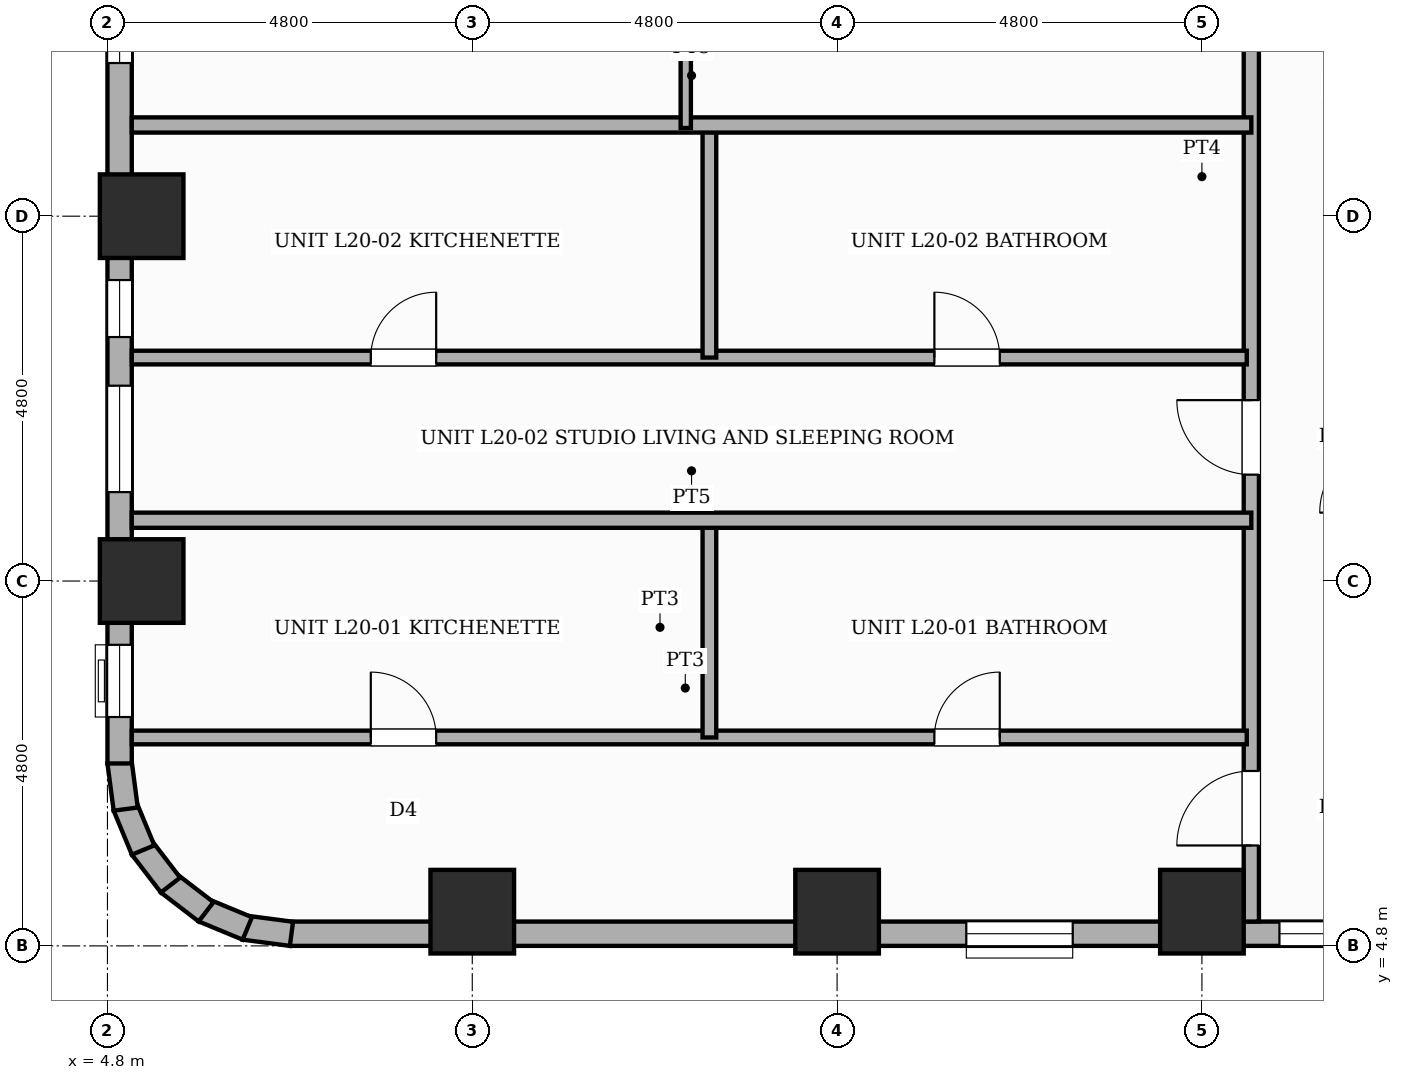
"""IFC4 building model, lengths in metres.
Left out: names, types, materials, properties, quantities, classifications, styles, units other than length and angle.
Written with IfcOpenShell. Run it as: python <this file> out.ifc"""

import sys

from ifc_helpers import new_model, si_unit, direction, frame, frame_2d, origin, origin_2d, place, context, subcontext, project, spatial, rectangle, extrude, element, fill, save


model = new_model("IFC4")
c1 = context("Model", 3, precision=1e-05, world=origin(), true_north=direction((0.0, 1.0)))
c2 = subcontext(c1, "Body", "Model", "MODEL_VIEW")
j1 = project(units=[si_unit("LENGTHUNIT", "METRE"), si_unit("PLANEANGLEUNIT", "RADIAN")], contexts=[c1])
p1 = place(None, origin())
s1 = spatial("IfcSite", under=j1, at=p1, CompositionType="ELEMENT")
p2 = place(p1, origin())
s2 = spatial("IfcBuilding", under=s1, at=p2, CompositionType="ELEMENT")
p3 = place(p2, frame((0.0, 0.0, 79.0)))
s3 = spatial("IfcBuildingStorey", under=s2, at=p3, CompositionType="ELEMENT", Elevation=79.0)
for number, where, z_axis, x_axis in (
    (1, (5.25, 9.6, 0.0), (0.0, 0.0, 1.0), (1.0, 0.0, 0.0)),
    (2, (5.25, 14.4, 0.0), (0.0, 0.0, 1.0), (1.0, 0.0, 0.0)),
    (3, (9.6, 5.25, 0.0), (0.0, 0.0, 1.0), (1.0, 0.0, 0.0)),
    (4, (14.4, 5.25, 0.0), (0.0, 0.0, 1.0), (1.0, 0.0, 0.0)),
    (5, (19.2, 5.25, 0.0), (0.0, 0.0, 1.0), (1.0, 0.0, 0.0)),
):
    element("IfcColumn", number, at=place(p3, frame(where, z_axis=z_axis, x_axis=x_axis)), inside=s3, PredefinedType="COLUMN", context=c2, shape_type="SweptSolid", body=[
        extrude(rectangle(XDim=1.1, YDim=1.1, at=origin_2d()), origin(), (0.0, 0.0, 1.0), 3.6),
    ])
p4 = place(p3, frame((21.6, 4.96, 0.0), z_axis=(0.0, 0.0, 1.0), x_axis=(-1.0, 0.0, 0.0)))
e6 = element("IfcWall", 6, at=p4, inside=s3, PredefinedType="STANDARD", context=c2, shape_type="SweptSolid", body=[
    extrude(rectangle(XDim=14.4, YDim=0.32, at=frame_2d((7.2, 0.0))), origin(), (0.0, 0.0, 1.0), 2.53),
])
p5 = place(p4, frame((4.1, 0.0, 0.65)))
e7 = element("IfcOpeningElement", 7, at=p5, cuts=e6, PredefinedType="OPENING", context=c2, shape_type="SweptSolid", body=[
    extrude(rectangle(XDim=1.4, YDim=1.1, at=frame_2d((0.7, 0.55))), frame((0.0, 0.17, 0.0), z_axis=(0.0, -1.0, 0.0), x_axis=(1.0, 0.0, 0.0)), (0.0, 0.0, 1.0), 0.34),
])
p6 = place(p4, frame((0.43, 0.0, 0.45)))
e8 = element("IfcOpeningElement", 8, at=p6, cuts=e6, PredefinedType="OPENING", context=c2, shape_type="SweptSolid", body=[
    extrude(rectangle(XDim=0.95, YDim=1.8, at=frame_2d((0.475, 0.9))), frame((0.0, 0.17, 0.0), z_axis=(0.0, -1.0, 0.0), x_axis=(1.0, 0.0, 0.0)), (0.0, 0.0, 1.0), 0.34),
])
p7 = place(p3, frame((7.221, 4.958, 0.0), z_axis=(0.0, 0.0, 1.0), x_axis=(-0.991447664465, 0.130504898859, 0.0)))
e9 = element("IfcWall", 9, at=p7, inside=s3, PredefinedType="STANDARD", context=c2, shape_type="SweptSolid", body=[
    extrude(rectangle(XDim=0.627, YDim=0.32, at=frame_2d((0.313, 0.0))), origin(), (0.0, 0.0, 1.0), 3.35),
])
p8 = place(p3, frame((6.64, 5.03, 0.0), z_axis=(0.0, 0.0, 1.0), x_axis=(-0.923836271867, 0.382787856107, 0.0)))
e10 = element("IfcWall", 10, at=p8, inside=s3, PredefinedType="STANDARD", context=c2, shape_type="SweptSolid", body=[
    extrude(rectangle(XDim=0.626, YDim=0.32, at=frame_2d((0.313, 0.0))), origin(), (0.0, 0.0, 1.0), 3.35),
])
for number, where, z_axis, x_axis in (
    (11, (6.097, 5.248, 0.0), (0.0, 0.0, 1.0), (-0.793, 0.609, 0.0)),
    (12, (5.63, 5.6, 0.0), (0.0, 0.0, 1.0), (-0.609, 0.793, 0.0)),
):
    element("IfcWall", number, at=place(p3, frame(where, z_axis=z_axis, x_axis=x_axis)), inside=s3, PredefinedType="STANDARD", context=c2, shape_type="SweptSolid", body=[
        extrude(rectangle(XDim=0.627, YDim=0.32, at=frame_2d((0.313, 0.0))), origin(), (0.0, 0.0, 1.0), 3.35),
    ])
p9 = place(p3, frame((5.269, 6.061, 0.0), z_axis=(0.0, 0.0, 1.0), x_axis=(-0.382787856107, 0.923836271867, 0.0)))
e13 = element("IfcWall", 13, at=p9, inside=s3, PredefinedType="STANDARD", context=c2, shape_type="SweptSolid", body=[
    extrude(rectangle(XDim=0.626, YDim=0.32, at=frame_2d((0.313, 0.0))), origin(), (0.0, 0.0, 1.0), 3.35),
])
p10 = place(p3, frame((5.04, 6.6, 0.0), z_axis=(0.0, 0.0, 1.0), x_axis=(-0.130504898859, 0.991447664465, 0.0)))
e14 = element("IfcWall", 14, at=p10, inside=s3, PredefinedType="STANDARD", context=c2, shape_type="SweptSolid", body=[
    extrude(rectangle(XDim=0.627, YDim=0.32, at=frame_2d((0.313, 0.0))), origin(), (0.0, 0.0, 1.0), 3.35),
])
p11 = place(p3, frame((4.96, 7.2, 0.0), z_axis=(0.0, 0.0, 1.0), x_axis=(0.0, 1.0, 0.0)))
e15 = element("IfcWall", 15, at=p11, inside=s3, PredefinedType="STANDARD", context=c2, shape_type="SweptSolid", body=[
    extrude(rectangle(XDim=38.4, YDim=0.32, at=frame_2d((19.2, 0.0))), origin(), (0.0, 0.0, 1.0), 2.53),
])
p12 = place(p11, frame((14.1, 0.0, 0.0)))
e16 = element("IfcOpeningElement", 16, at=p12, cuts=e15, PredefinedType="OPENING", context=c2, shape_type="SweptSolid", body=[
    extrude(rectangle(XDim=1.1, YDim=2.15, at=frame_2d((0.55, 1.075))), frame((0.0, 0.17, 0.0), z_axis=(0.0, -1.0, 0.0), x_axis=(1.0, 0.0, 0.0)), (0.0, 0.0, 1.0), 0.34),
])
p13 = place(p11, frame((3.57, 0.0, 0.65)))
e17 = element("IfcOpeningElement", 17, at=p13, cuts=e15, PredefinedType="OPENING", context=c2, shape_type="SweptSolid", body=[
    extrude(rectangle(XDim=1.4, YDim=1.1, at=frame_2d((0.7, 0.55))), frame((0.0, 0.17, 0.0), z_axis=(0.0, -1.0, 0.0), x_axis=(1.0, 0.0, 0.0)), (0.0, 0.0, 1.0), 0.34),
])
p14 = place(p11, frame((0.611, 0.0, 0.45)))
e18 = element("IfcOpeningElement", 18, at=p14, cuts=e15, PredefinedType="OPENING", context=c2, shape_type="SweptSolid", body=[
    extrude(rectangle(XDim=0.95, YDim=1.8, at=frame_2d((0.475, 0.9))), frame((0.0, 0.17, 0.0), z_axis=(0.0, -1.0, 0.0), x_axis=(1.0, 0.0, 0.0)), (0.0, 0.0, 1.0), 0.34),
])
p15 = place(p11, frame((5.61, 0.0, 0.45)))
e19 = element("IfcOpeningElement", 19, at=p15, cuts=e15, PredefinedType="OPENING", context=c2, shape_type="SweptSolid", body=[
    extrude(rectangle(XDim=0.75, YDim=1.8, at=frame_2d((0.375, 0.9))), frame((0.0, 0.17, 0.0), z_axis=(0.0, -1.0, 0.0), x_axis=(1.0, 0.0, 0.0)), (0.0, 0.0, 1.0), 0.34),
])
p16 = place(p11, frame((9.215, 0.0, 0.65)))
e20 = element("IfcOpeningElement", 20, at=p16, cuts=e15, PredefinedType="OPENING", context=c2, shape_type="SweptSolid", body=[
    extrude(rectangle(XDim=1.4, YDim=1.1, at=frame_2d((0.7, 0.55))), frame((0.0, 0.17, 0.0), z_axis=(0.0, -1.0, 0.0), x_axis=(1.0, 0.0, 0.0)), (0.0, 0.0, 1.0), 0.34),
])
p17 = place(p11, frame((17.58, 0.0, 0.45)))
e21 = element("IfcOpeningElement", 21, at=p17, cuts=e15, PredefinedType="OPENING", context=c2, shape_type="SweptSolid", body=[
    extrude(rectangle(XDim=0.75, YDim=1.8, at=frame_2d((0.375, 0.9))), frame((0.0, 0.17, 0.0), z_axis=(0.0, -1.0, 0.0), x_axis=(1.0, 0.0, 0.0)), (0.0, 0.0, 1.0), 0.34),
])
p18 = place(p3, frame((19.85, 5.12, 0.0), z_axis=(0.0, 0.0, 1.0), x_axis=(0.0, 1.0, 0.0)))
e22 = element("IfcWall", 22, at=p18, inside=s3, PredefinedType="PARTITIONING", context=c2, shape_type="SweptSolid", body=[
    extrude(rectangle(XDim=18.28, YDim=0.2, at=frame_2d((9.14, 0.0))), origin(), (0.0, 0.0, 1.0), 3.35),
])
p19 = place(p18, frame((1.001, 0.0, 0.0)))
e23 = element("IfcOpeningElement", 23, at=p19, cuts=e22, PredefinedType="OPENING", context=c2, shape_type="SweptSolid", body=[
    extrude(rectangle(XDim=0.98, YDim=2.18, at=frame_2d((0.49, 1.09))), frame((0.0, 0.11, 0.0), z_axis=(0.0, -1.0, 0.0), x_axis=(1.0, 0.0, 0.0)), (0.0, 0.0, 1.0), 0.22),
])
p20 = place(p18, frame((5.88, 0.0, 0.0)))
e24 = element("IfcOpeningElement", 24, at=p20, cuts=e22, PredefinedType="OPENING", context=c2, shape_type="SweptSolid", body=[
    extrude(rectangle(XDim=0.98, YDim=2.18, at=frame_2d((0.49, 1.09))), frame((0.0, 0.11, 0.0), z_axis=(0.0, -1.0, 0.0), x_axis=(1.0, 0.0, 0.0)), (0.0, 0.0, 1.0), 0.22),
])
p21 = place(p18, frame((12.74, 0.0, 0.0)))
e25 = element("IfcOpeningElement", 25, at=p21, cuts=e22, PredefinedType="OPENING", context=c2, shape_type="SweptSolid", body=[
    extrude(rectangle(XDim=0.98, YDim=2.18, at=frame_2d((0.49, 1.09))), frame((0.0, 0.11, 0.0), z_axis=(0.0, -1.0, 0.0), x_axis=(1.0, 0.0, 0.0)), (0.0, 0.0, 1.0), 0.22),
])
p22 = place(p3, frame((5.12, 7.542, 0.0), z_axis=(0.0, 0.0, 1.0), x_axis=(1.0, 0.0, 0.0)))
e26 = element("IfcWall", 26, at=p22, inside=s3, PredefinedType="PLUMBINGWALL", context=c2, shape_type="SweptSolid", body=[
    extrude(rectangle(XDim=14.67, YDim=0.18, at=frame_2d((7.335, 0.0))), origin(), (0.0, 0.0, 1.0), 3.35),
])
p23 = place(p22, frame((3.145, 0.0, 0.0)))
e27 = element("IfcOpeningElement", 27, at=p23, cuts=e26, PredefinedType="OPENING", context=c2, shape_type="SweptSolid", body=[
    extrude(rectangle(XDim=0.86, YDim=2.1, at=frame_2d((0.43, 1.05))), frame((0.0, 0.1, 0.0), z_axis=(0.0, -1.0, 0.0), x_axis=(1.0, 0.0, 0.0)), (0.0, 0.0, 1.0), 0.2),
])
p24 = place(p22, frame((10.56, 0.0, 0.0)))
e28 = element("IfcOpeningElement", 28, at=p24, cuts=e26, PredefinedType="OPENING", context=c2, shape_type="SweptSolid", body=[
    extrude(rectangle(XDim=0.86, YDim=2.1, at=frame_2d((0.43, 1.05))), frame((0.0, 0.1, 0.0), z_axis=(0.0, -1.0, 0.0), x_axis=(1.0, 0.0, 0.0)), (0.0, 0.0, 1.0), 0.2),
])
p25 = place(p3, frame((12.72, 7.542, 0.0), z_axis=(0.0, 0.0, 1.0), x_axis=(0.0, 1.0, 0.0)))
e29 = element("IfcWall", 29, at=p25, inside=s3, PredefinedType="PLUMBINGWALL", context=c2, shape_type="SweptSolid", body=[
    extrude(rectangle(XDim=2.898, YDim=0.18, at=frame_2d((1.449, 0.0))), origin(), (0.0, 0.0, 1.0), 3.35),
])
p26 = place(p3, frame((5.12, 10.4, 0.0), z_axis=(0.0, 0.0, 1.0), x_axis=(1.0, 0.0, 0.0)))
e30 = element("IfcWall", 30, at=p26, inside=s3, PredefinedType="SOLIDWALL", context=c2, shape_type="SweptSolid", body=[
    extrude(rectangle(XDim=14.73, YDim=0.2, at=frame_2d((7.365, 0.0))), origin(), (0.0, 0.0, 1.0), 3.35),
])
p27 = place(p3, frame((5.12, 12.54, 0.0), z_axis=(0.0, 0.0, 1.0), x_axis=(1.0, 0.0, 0.0)))
e31 = element("IfcWall", 31, at=p27, inside=s3, PredefinedType="PLUMBINGWALL", context=c2, shape_type="SweptSolid", body=[
    extrude(rectangle(XDim=14.67, YDim=0.18, at=frame_2d((7.335, 0.0))), origin(), (0.0, 0.0, 1.0), 3.35),
])
p28 = place(p27, frame((3.145, 0.0, 0.0)))
e32 = element("IfcOpeningElement", 32, at=p28, cuts=e31, PredefinedType="OPENING", context=c2, shape_type="SweptSolid", body=[
    extrude(rectangle(XDim=0.86, YDim=2.1, at=frame_2d((0.43, 1.05))), frame((0.0, 0.1, 0.0), z_axis=(0.0, -1.0, 0.0), x_axis=(1.0, 0.0, 0.0)), (0.0, 0.0, 1.0), 0.2),
])
p29 = place(p27, frame((10.56, 0.0, 0.0)))
e33 = element("IfcOpeningElement", 33, at=p29, cuts=e31, PredefinedType="OPENING", context=c2, shape_type="SweptSolid", body=[
    extrude(rectangle(XDim=0.86, YDim=2.1, at=frame_2d((0.43, 1.05))), frame((0.0, 0.1, 0.0), z_axis=(0.0, -1.0, 0.0), x_axis=(1.0, 0.0, 0.0)), (0.0, 0.0, 1.0), 0.2),
])
p30 = place(p3, frame((12.72, 12.54, 0.0), z_axis=(0.0, 0.0, 1.0), x_axis=(0.0, 1.0, 0.0)))
e34 = element("IfcWall", 34, at=p30, inside=s3, PredefinedType="PLUMBINGWALL", context=c2, shape_type="SweptSolid", body=[
    extrude(rectangle(XDim=3.1, YDim=0.18, at=frame_2d((1.55, 0.0))), origin(), (0.0, 0.0, 1.0), 3.35),
])
p31 = place(p3, frame((5.12, 15.6, 0.0), z_axis=(0.0, 0.0, 1.0), x_axis=(1.0, 0.0, 0.0)))
e35 = element("IfcWall", 35, at=p31, inside=s3, PredefinedType="SOLIDWALL", context=c2, shape_type="SweptSolid", body=[
    extrude(rectangle(XDim=14.73, YDim=0.2, at=frame_2d((7.365, 0.0))), origin(), (0.0, 0.0, 1.0), 3.35),
])
p32 = place(p3, frame((12.409, 15.56, 0.0), z_axis=(0.0, 0.0, 1.0), x_axis=(0.0, 1.0, 0.0)))
e36 = element("IfcWall", 36, at=p32, inside=s3, PredefinedType="PARTITIONING", context=c2, shape_type="SweptSolid", body=[
    extrude(rectangle(XDim=5.5, YDim=0.135, at=frame_2d((2.75, 0.0))), origin(), (0.0, 0.0, 1.0), 3.35),
])
p33 = place(p32, frame((2.034, 0.0, 0.0)))
e37 = element("IfcOpeningElement", 37, at=p33, cuts=e36, PredefinedType="OPENING", context=c2, shape_type="SweptSolid", body=[
    extrude(rectangle(XDim=0.9, YDim=2.15, at=frame_2d((0.45, 1.075))), frame((0.0, 0.078, 0.0), z_axis=(0.0, -1.0, 0.0), x_axis=(1.0, 0.0, 0.0)), (0.0, 0.0, 1.0), 0.155),
])
p34 = place(p5, origin())
e38 = element("IfcWindow", 38, at=p34, inside=s3, PartitioningType="SINGLE_PANEL", PredefinedType="WINDOW", context=c2, shape_type="SweptSolid", body=[
    extrude(rectangle(XDim=1.4, YDim=1.1, at=frame_2d((0.7, 0.55))), frame((0.0, 0.03, 0.0), z_axis=(0.0, -1.0, 0.0), x_axis=(1.0, 0.0, 0.0)), (0.0, 0.0, 1.0), 0.06),
])
fill(e7, e38)
p35 = place(p6, origin())
e39 = element("IfcWindow", 39, at=p35, inside=s3, PartitioningType="SINGLE_PANEL", PredefinedType="WINDOW", context=c2, shape_type="SweptSolid", body=[
    extrude(rectangle(XDim=0.95, YDim=1.8, at=frame_2d((0.475, 0.9))), frame((0.0, 0.03, 0.0), z_axis=(0.0, -1.0, 0.0), x_axis=(1.0, 0.0, 0.0)), (0.0, 0.0, 1.0), 0.06),
])
fill(e8, e39)
p36 = place(p13, origin())
e40 = element("IfcWindow", 40, at=p36, inside=s3, PartitioningType="SINGLE_PANEL", PredefinedType="WINDOW", context=c2, shape_type="SweptSolid", body=[
    extrude(rectangle(XDim=1.4, YDim=1.1, at=frame_2d((0.7, 0.55))), frame((0.0, 0.03, 0.0), z_axis=(0.0, -1.0, 0.0), x_axis=(1.0, 0.0, 0.0)), (0.0, 0.0, 1.0), 0.06),
])
fill(e17, e40)
p37 = place(p14, origin())
e41 = element("IfcWindow", 41, at=p37, inside=s3, PartitioningType="SINGLE_PANEL", PredefinedType="WINDOW", context=c2, shape_type="SweptSolid", body=[
    extrude(rectangle(XDim=0.95, YDim=1.8, at=frame_2d((0.475, 0.9))), frame((0.0, 0.03, 0.0), z_axis=(0.0, -1.0, 0.0), x_axis=(1.0, 0.0, 0.0)), (0.0, 0.0, 1.0), 0.06),
])
fill(e18, e41)
p38 = place(p15, origin())
e42 = element("IfcWindow", 42, at=p38, inside=s3, PartitioningType="SINGLE_PANEL", PredefinedType="WINDOW", context=c2, shape_type="SweptSolid", body=[
    extrude(rectangle(XDim=0.75, YDim=1.8, at=frame_2d((0.375, 0.9))), frame((0.0, 0.03, 0.0), z_axis=(0.0, -1.0, 0.0), x_axis=(1.0, 0.0, 0.0)), (0.0, 0.0, 1.0), 0.06),
])
fill(e19, e42)
p39 = place(p16, origin())
e43 = element("IfcWindow", 43, at=p39, inside=s3, PartitioningType="SINGLE_PANEL", PredefinedType="WINDOW", context=c2, shape_type="SweptSolid", body=[
    extrude(rectangle(XDim=1.4, YDim=1.1, at=frame_2d((0.7, 0.55))), frame((0.0, 0.03, 0.0), z_axis=(0.0, -1.0, 0.0), x_axis=(1.0, 0.0, 0.0)), (0.0, 0.0, 1.0), 0.06),
])
fill(e20, e43)
p40 = place(p19, origin())
e44 = element("IfcDoor", 44, at=p40, inside=s3, OperationType="SINGLE_SWING_LEFT", PredefinedType="DOOR", context=c2, shape_type="SweptSolid", body=[
    extrude(rectangle(XDim=0.98, YDim=2.18, at=frame_2d((0.49, 1.09))), frame((0.0, 0.025, 0.0), z_axis=(0.0, -1.0, 0.0), x_axis=(1.0, 0.0, 0.0)), (0.0, 0.0, 1.0), 0.05),
])
fill(e23, e44)
p41 = place(p23, origin())
e45 = element("IfcDoor", 45, at=p41, inside=s3, OperationType="SINGLE_SWING_LEFT", PredefinedType="DOOR", context=c2, shape_type="SweptSolid", body=[
    extrude(rectangle(XDim=0.86, YDim=2.1, at=frame_2d((0.43, 1.05))), frame((0.0, 0.025, 0.0), z_axis=(0.0, -1.0, 0.0), x_axis=(1.0, 0.0, 0.0)), (0.0, 0.0, 1.0), 0.05),
])
fill(e27, e45)
p42 = place(p24, origin())
e46 = element("IfcDoor", 46, at=p42, inside=s3, OperationType="SINGLE_SWING_RIGHT", PredefinedType="DOOR", context=c2, shape_type="SweptSolid", body=[
    extrude(rectangle(XDim=0.86, YDim=2.1, at=frame_2d((0.43, 1.05))), frame((0.0, 0.025, 0.0), z_axis=(0.0, -1.0, 0.0), x_axis=(1.0, 0.0, 0.0)), (0.0, 0.0, 1.0), 0.05),
])
fill(e28, e46)
p43 = place(p20, origin())
e47 = element("IfcDoor", 47, at=p43, inside=s3, OperationType="SINGLE_SWING_RIGHT", PredefinedType="DOOR", context=c2, shape_type="SweptSolid", body=[
    extrude(rectangle(XDim=0.98, YDim=2.18, at=frame_2d((0.49, 1.09))), frame((0.0, 0.025, 0.0), z_axis=(0.0, -1.0, 0.0), x_axis=(1.0, 0.0, 0.0)), (0.0, 0.0, 1.0), 0.05),
])
fill(e24, e47)
p44 = place(p28, origin())
e48 = element("IfcDoor", 48, at=p44, inside=s3, OperationType="SINGLE_SWING_RIGHT", PredefinedType="DOOR", context=c2, shape_type="SweptSolid", body=[
    extrude(rectangle(XDim=0.86, YDim=2.1, at=frame_2d((0.43, 1.05))), frame((0.0, 0.025, 0.0), z_axis=(0.0, -1.0, 0.0), x_axis=(1.0, 0.0, 0.0)), (0.0, 0.0, 1.0), 0.05),
])
fill(e32, e48)
p45 = place(p29, origin())
e49 = element("IfcDoor", 49, at=p45, inside=s3, OperationType="SINGLE_SWING_LEFT", PredefinedType="DOOR", context=c2, shape_type="SweptSolid", body=[
    extrude(rectangle(XDim=0.86, YDim=2.1, at=frame_2d((0.43, 1.05))), frame((0.0, 0.025, 0.0), z_axis=(0.0, -1.0, 0.0), x_axis=(1.0, 0.0, 0.0)), (0.0, 0.0, 1.0), 0.05),
])
fill(e33, e49)
save(model, sys.argv[1])
